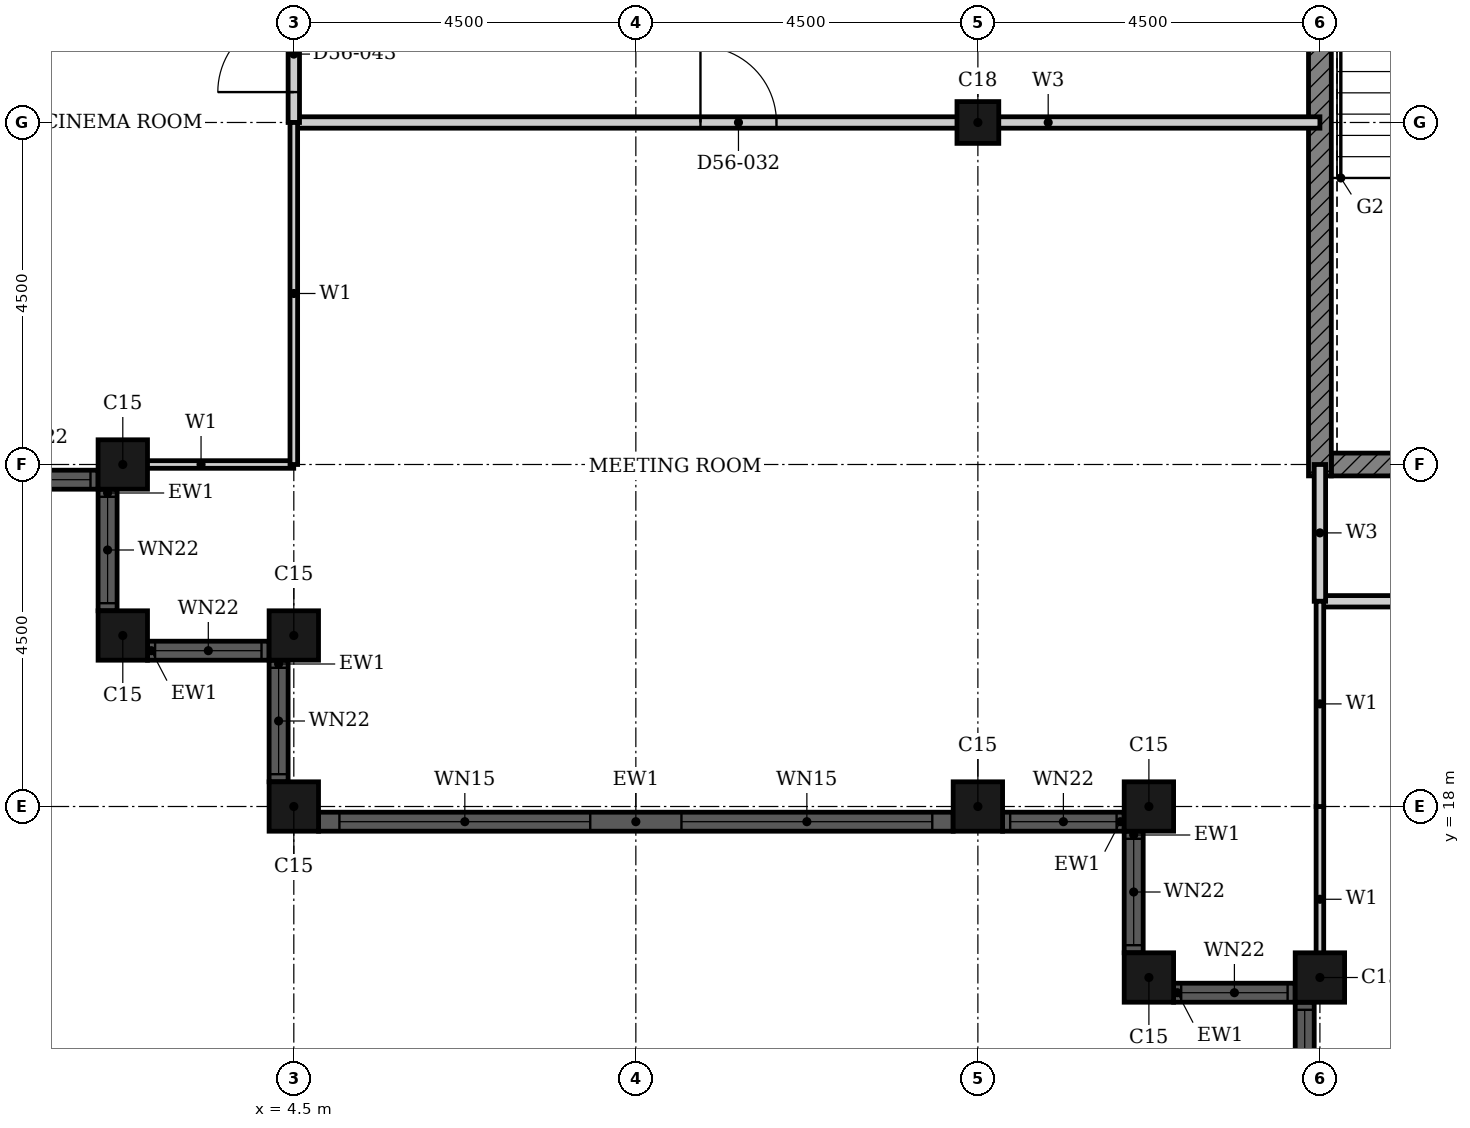
"""IFC4 building model, lengths in metres.
Left out: names, types, materials, properties, quantities, classifications, styles, units other than length and angle.
Written with IfcOpenShell. Run it as: python <this file> out.ifc"""

import sys

from ifc_helpers import new_model, si_unit, direction, frame, frame_2d, origin, origin_2d, place, context, subcontext, project, spatial, rectangle, hollow_rectangle, extrude, element, fill, save


model = new_model("IFC4")
c1 = context("Model", 3, precision=1e-05, world=origin(), true_north=direction((0.0, 1.0)))
c2 = subcontext(c1, "Body", "Model", "MODEL_VIEW")
j1 = project(units=[si_unit("LENGTHUNIT", "METRE"), si_unit("PLANEANGLEUNIT", "RADIAN")], contexts=[c1])
p1 = place(None, origin())
s1 = spatial("IfcSite", under=j1, at=p1, CompositionType="ELEMENT")
p2 = place(p1, origin())
s2 = spatial("IfcBuilding", under=s1, at=p2, CompositionType="ELEMENT")
p3 = place(p2, frame((0.0, 0.0, 222.0)))
s3 = spatial("IfcBuildingStorey", under=s2, at=p3, CompositionType="ELEMENT", Elevation=222.0)
for number, where, z_axis, x_axis in (
    (1, (2.25, 22.5, 0.0), (0.0, 0.0, 1.0), (1.0, 0.0, 0.0)),
    (2, (2.25, 20.25, 0.0), (0.0, 0.0, 1.0), (1.0, 0.0, 0.0)),
    (3, (4.5, 20.25, 0.0), (0.0, 0.0, 1.0), (1.0, 0.0, 0.0)),
    (4, (4.5, 18.0, 0.0), (0.0, 0.0, 1.0), (1.0, 0.0, 0.0)),
    (5, (13.5, 18.0, 0.0), (0.0, 0.0, 1.0), (1.0, 0.0, 0.0)),
    (6, (15.75, 18.0, 0.0), (0.0, 0.0, 1.0), (1.0, 0.0, 0.0)),
    (7, (15.75, 15.75, 0.0), (0.0, 0.0, 1.0), (1.0, 0.0, 0.0)),
    (8, (18.0, 15.75, 0.0), (0.0, 0.0, 1.0), (1.0, 0.0, 0.0)),
):
    element("IfcColumn", number, at=place(p3, frame(where, z_axis=z_axis, x_axis=x_axis)), inside=s3, PredefinedType="COLUMN", context=c2, shape_type="SweptSolid", body=[
        extrude(hollow_rectangle(XDim=0.65, YDim=0.65, WallThickness=0.021, at=origin_2d()), origin(), (0.0, 0.0, 1.0), 3.7),
    ])
p4 = place(p3, frame((13.5, 27.0, 0.0), z_axis=(0.0, 0.0, 1.0), x_axis=(1.0, 0.0, 0.0)))
e9 = element("IfcColumn", 9, at=p4, inside=s3, PredefinedType="COLUMN", context=c2, shape_type="SweptSolid", body=[
    extrude(hollow_rectangle(XDim=0.55, YDim=0.55, WallThickness=0.018, at=origin_2d()), origin(), (0.0, 0.0, 1.0), 3.7),
])
p5 = place(p3, frame((0.325, 22.3, 0.0), z_axis=(0.0, 0.0, 1.0), x_axis=(1.0, 0.0, 0.0)))
e10 = element("IfcWall", 10, at=p5, inside=s3, PredefinedType="SOLIDWALL", context=c2, shape_type="SweptSolid", body=[
    extrude(rectangle(XDim=1.6, YDim=0.25, at=frame_2d((0.8, 0.0))), origin(), (0.0, 0.0, 1.0), 3.7),
])
p6 = place(p5, frame((0.1, 0.0, 0.9)))
e11 = element("IfcOpeningElement", 11, at=p6, cuts=e10, PredefinedType="OPENING", context=c2, shape_type="SweptSolid", body=[
    extrude(rectangle(XDim=1.4, YDim=1.85, at=frame_2d((0.7, 0.925))), frame((0.0, 0.135, 0.0), z_axis=(0.0, -1.0, 0.0), x_axis=(1.0, 0.0, 0.0)), (0.0, 0.0, 1.0), 0.27),
])
p7 = place(p3, frame((2.05, 22.175, 0.0), z_axis=(0.0, 0.0, 1.0), x_axis=(0.0, -1.0, 0.0)))
e12 = element("IfcWall", 12, at=p7, inside=s3, PredefinedType="SOLIDWALL", context=c2, shape_type="SweptSolid", body=[
    extrude(rectangle(XDim=1.6, YDim=0.25, at=frame_2d((0.8, 0.0))), origin(), (0.0, 0.0, 1.0), 3.7),
])
p8 = place(p7, frame((0.1, 0.0, 0.9)))
e13 = element("IfcOpeningElement", 13, at=p8, cuts=e12, PredefinedType="OPENING", context=c2, shape_type="SweptSolid", body=[
    extrude(rectangle(XDim=1.4, YDim=1.85, at=frame_2d((0.7, 0.925))), frame((0.0, 0.135, 0.0), z_axis=(0.0, -1.0, 0.0), x_axis=(1.0, 0.0, 0.0)), (0.0, 0.0, 1.0), 0.27),
])
p9 = place(p3, frame((2.575, 20.05, 0.0), z_axis=(0.0, 0.0, 1.0), x_axis=(1.0, 0.0, 0.0)))
e14 = element("IfcWall", 14, at=p9, inside=s3, PredefinedType="SOLIDWALL", context=c2, shape_type="SweptSolid", body=[
    extrude(rectangle(XDim=1.6, YDim=0.25, at=frame_2d((0.8, 0.0))), origin(), (0.0, 0.0, 1.0), 3.7),
])
p10 = place(p9, frame((0.1, 0.0, 0.9)))
e15 = element("IfcOpeningElement", 15, at=p10, cuts=e14, PredefinedType="OPENING", context=c2, shape_type="SweptSolid", body=[
    extrude(rectangle(XDim=1.4, YDim=1.85, at=frame_2d((0.7, 0.925))), frame((0.0, 0.135, 0.0), z_axis=(0.0, -1.0, 0.0), x_axis=(1.0, 0.0, 0.0)), (0.0, 0.0, 1.0), 0.27),
])
p11 = place(p3, frame((4.3, 19.925, 0.0), z_axis=(0.0, 0.0, 1.0), x_axis=(0.0, -1.0, 0.0)))
e16 = element("IfcWall", 16, at=p11, inside=s3, PredefinedType="SOLIDWALL", context=c2, shape_type="SweptSolid", body=[
    extrude(rectangle(XDim=1.6, YDim=0.25, at=frame_2d((0.8, 0.0))), origin(), (0.0, 0.0, 1.0), 3.7),
])
p12 = place(p11, frame((0.1, 0.0, 0.9)))
e17 = element("IfcOpeningElement", 17, at=p12, cuts=e16, PredefinedType="OPENING", context=c2, shape_type="SweptSolid", body=[
    extrude(rectangle(XDim=1.4, YDim=1.85, at=frame_2d((0.7, 0.925))), frame((0.0, 0.135, 0.0), z_axis=(0.0, -1.0, 0.0), x_axis=(1.0, 0.0, 0.0)), (0.0, 0.0, 1.0), 0.27),
])
p13 = place(p3, frame((4.825, 17.8, 0.0), z_axis=(0.0, 0.0, 1.0), x_axis=(1.0, 0.0, 0.0)))
e18 = element("IfcWall", 18, at=p13, inside=s3, PredefinedType="SOLIDWALL", context=c2, shape_type="SweptSolid", body=[
    extrude(rectangle(XDim=8.35, YDim=0.25, at=frame_2d((4.175, 0.0))), origin(), (0.0, 0.0, 1.0), 3.7),
])
p14 = place(p13, frame((0.275, 0.0, 0.45)))
e19 = element("IfcOpeningElement", 19, at=p14, cuts=e18, PredefinedType="OPENING", context=c2, shape_type="SweptSolid", body=[
    extrude(rectangle(XDim=3.3, YDim=2.3, at=frame_2d((1.65, 1.15))), frame((0.0, 0.135, 0.0), z_axis=(0.0, -1.0, 0.0), x_axis=(1.0, 0.0, 0.0)), (0.0, 0.0, 1.0), 0.27),
])
p15 = place(p13, frame((4.775, 0.0, 0.45)))
e20 = element("IfcOpeningElement", 20, at=p15, cuts=e18, PredefinedType="OPENING", context=c2, shape_type="SweptSolid", body=[
    extrude(rectangle(XDim=3.3, YDim=2.3, at=frame_2d((1.65, 1.15))), frame((0.0, 0.135, 0.0), z_axis=(0.0, -1.0, 0.0), x_axis=(1.0, 0.0, 0.0)), (0.0, 0.0, 1.0), 0.27),
])
p16 = place(p3, frame((13.825, 17.8, 0.0), z_axis=(0.0, 0.0, 1.0), x_axis=(1.0, 0.0, 0.0)))
e21 = element("IfcWall", 21, at=p16, inside=s3, PredefinedType="SOLIDWALL", context=c2, shape_type="SweptSolid", body=[
    extrude(rectangle(XDim=1.6, YDim=0.25, at=frame_2d((0.8, 0.0))), origin(), (0.0, 0.0, 1.0), 3.7),
])
p17 = place(p16, frame((0.1, 0.0, 0.9)))
e22 = element("IfcOpeningElement", 22, at=p17, cuts=e21, PredefinedType="OPENING", context=c2, shape_type="SweptSolid", body=[
    extrude(rectangle(XDim=1.4, YDim=1.85, at=frame_2d((0.7, 0.925))), frame((0.0, 0.135, 0.0), z_axis=(0.0, -1.0, 0.0), x_axis=(1.0, 0.0, 0.0)), (0.0, 0.0, 1.0), 0.27),
])
p18 = place(p3, frame((15.55, 17.675, 0.0), z_axis=(0.0, 0.0, 1.0), x_axis=(0.0, -1.0, 0.0)))
e23 = element("IfcWall", 23, at=p18, inside=s3, PredefinedType="SOLIDWALL", context=c2, shape_type="SweptSolid", body=[
    extrude(rectangle(XDim=1.6, YDim=0.25, at=frame_2d((0.8, 0.0))), origin(), (0.0, 0.0, 1.0), 3.7),
])
p19 = place(p18, frame((0.1, 0.0, 0.9)))
e24 = element("IfcOpeningElement", 24, at=p19, cuts=e23, PredefinedType="OPENING", context=c2, shape_type="SweptSolid", body=[
    extrude(rectangle(XDim=1.4, YDim=1.85, at=frame_2d((0.7, 0.925))), frame((0.0, 0.135, 0.0), z_axis=(0.0, -1.0, 0.0), x_axis=(1.0, 0.0, 0.0)), (0.0, 0.0, 1.0), 0.27),
])
p20 = place(p3, frame((16.075, 15.55, 0.0), z_axis=(0.0, 0.0, 1.0), x_axis=(1.0, 0.0, 0.0)))
e25 = element("IfcWall", 25, at=p20, inside=s3, PredefinedType="SOLIDWALL", context=c2, shape_type="SweptSolid", body=[
    extrude(rectangle(XDim=1.6, YDim=0.25, at=frame_2d((0.8, 0.0))), origin(), (0.0, 0.0, 1.0), 3.7),
])
p21 = place(p20, frame((0.1, 0.0, 0.9)))
e26 = element("IfcOpeningElement", 26, at=p21, cuts=e25, PredefinedType="OPENING", context=c2, shape_type="SweptSolid", body=[
    extrude(rectangle(XDim=1.4, YDim=1.85, at=frame_2d((0.7, 0.925))), frame((0.0, 0.135, 0.0), z_axis=(0.0, -1.0, 0.0), x_axis=(1.0, 0.0, 0.0)), (0.0, 0.0, 1.0), 0.27),
])
p22 = place(p3, frame((17.8, 15.425, 0.0), z_axis=(0.0, 0.0, 1.0), x_axis=(0.0, -1.0, 0.0)))
e27 = element("IfcWall", 27, at=p22, inside=s3, PredefinedType="SOLIDWALL", context=c2, shape_type="SweptSolid", body=[
    extrude(rectangle(XDim=1.6, YDim=0.25, at=frame_2d((0.8, 0.0))), origin(), (0.0, 0.0, 1.0), 3.7),
])
p23 = place(p22, frame((0.1, 0.0, 0.9)))
e28 = element("IfcOpeningElement", 28, at=p23, cuts=e27, PredefinedType="OPENING", context=c2, shape_type="SweptSolid", body=[
    extrude(rectangle(XDim=1.4, YDim=1.85, at=frame_2d((0.7, 0.925))), frame((0.0, 0.135, 0.0), z_axis=(0.0, -1.0, 0.0), x_axis=(1.0, 0.0, 0.0)), (0.0, 0.0, 1.0), 0.27),
])
p24 = place(p3, frame((18.15, 22.5, 0.0), z_axis=(0.0, 0.0, 1.0), x_axis=(1.0, 0.0, 0.0)))
e29 = element("IfcWall", 29, at=p24, inside=s3, PredefinedType="SHEAR", context=c2, shape_type="SweptSolid", body=[
    extrude(rectangle(XDim=4.225, YDim=0.3, at=frame_2d((2.113, 0.0))), origin(), (0.0, 0.0, 1.0), 3.4),
])
p25 = place(p3, frame((18.0, 22.35, 0.0), z_axis=(0.0, 0.0, 1.0), x_axis=(0.0, 1.0, 0.0)))
e30 = element("IfcWall", 30, at=p25, inside=s3, PredefinedType="SHEAR", context=c2, shape_type="SweptSolid", body=[
    extrude(rectangle(XDim=9.3, YDim=0.3, at=frame_2d((4.65, 0.0))), origin(), (0.0, 0.0, 1.0), 3.4),
])
p26 = place(p3, frame((18.0, 20.7, 0.0), z_axis=(0.0, 0.0, 1.0), x_axis=(1.0, 0.0, 0.0)))
e31 = element("IfcWall", 31, at=p26, inside=s3, PredefinedType="PARTITIONING", context=c2, shape_type="SweptSolid", body=[
    extrude(rectangle(XDim=13.5, YDim=0.15, at=frame_2d((6.75, 0.0))), origin(), (0.0, 0.0, 1.0), 3.4),
])
p27 = place(p26, frame((6.25, 0.0, 0.0)))
e32 = element("IfcOpeningElement", 32, at=p27, cuts=e31, PredefinedType="OPENING", context=c2, shape_type="SweptSolid", body=[
    extrude(rectangle(XDim=1.0, YDim=2.1, at=frame_2d((0.5, 1.05))), frame((0.0, 0.085, 0.0), z_axis=(0.0, -1.0, 0.0), x_axis=(1.0, 0.0, 0.0)), (0.0, 0.0, 1.0), 0.17),
])
p28 = place(p3, frame((4.5, 27.0, 0.0), z_axis=(0.0, 0.0, 1.0), x_axis=(1.0, 0.0, 0.0)))
e33 = element("IfcWall", 33, at=p28, inside=s3, PredefinedType="PARTITIONING", context=c2, shape_type="SweptSolid", body=[
    extrude(rectangle(XDim=13.5, YDim=0.15, at=frame_2d((6.75, 0.0))), origin(), (0.0, 0.0, 1.0), 2.68),
])
p29 = place(p28, frame((5.35, 0.0, 0.0)))
e34 = element("IfcOpeningElement", 34, at=p29, cuts=e33, PredefinedType="OPENING", context=c2, shape_type="SweptSolid", body=[
    extrude(rectangle(XDim=1.0, YDim=2.1, at=frame_2d((0.5, 1.05))), frame((0.0, 0.085, 0.0), z_axis=(0.0, -1.0, 0.0), x_axis=(1.0, 0.0, 0.0)), (0.0, 0.0, 1.0), 0.17),
])
p30 = place(p3, frame((18.0, 20.7, 0.0), z_axis=(0.0, 0.0, 1.0), x_axis=(0.0, 1.0, 0.0)))
e35 = element("IfcWall", 35, at=p30, inside=s3, PredefinedType="PARTITIONING", context=c2, shape_type="SweptSolid", body=[
    extrude(rectangle(XDim=1.8, YDim=0.15, at=frame_2d((0.9, 0.0))), origin(), (0.0, 0.0, 1.0), 3.4),
])
p31 = place(p3, frame((4.5, 27.0, 0.0), z_axis=(0.0, 0.0, 1.0), x_axis=(0.0, 1.0, 0.0)))
e36 = element("IfcWall", 36, at=p31, inside=s3, PredefinedType="PARTITIONING", context=c2, shape_type="SweptSolid", body=[
    extrude(rectangle(XDim=1.8, YDim=0.15, at=frame_2d((0.9, 0.0))), origin(), (0.0, 0.0, 1.0), 3.4),
])
p32 = place(p31, frame((0.4, 0.0, 0.0)))
e37 = element("IfcOpeningElement", 37, at=p32, cuts=e36, PredefinedType="OPENING", context=c2, shape_type="SweptSolid", body=[
    extrude(rectangle(XDim=1.0, YDim=2.1, at=frame_2d((0.5, 1.05))), frame((0.0, 0.085, 0.0), z_axis=(0.0, -1.0, 0.0), x_axis=(1.0, 0.0, 0.0)), (0.0, 0.0, 1.0), 0.17),
])
p33 = place(p3, frame((2.06, 22.5, 0.0), z_axis=(0.0, 0.0, 1.0), x_axis=(1.0, 0.0, 0.0)))
e38 = element("IfcWall", 38, at=p33, inside=s3, PredefinedType="PARTITIONING", context=c2, shape_type="SweptSolid", body=[
    extrude(rectangle(XDim=2.439, YDim=0.1, at=frame_2d((1.219, 0.0))), origin(), (0.0, 0.0, 1.0), 2.68),
])
p34 = place(p3, frame((18.0, 15.56, 0.0), z_axis=(0.0, 0.0, 1.0), x_axis=(0.0, 1.0, 0.0)))
e39 = element("IfcWall", 39, at=p34, inside=s3, PredefinedType="PARTITIONING", context=c2, shape_type="SweptSolid", body=[
    extrude(rectangle(XDim=2.439, YDim=0.1, at=frame_2d((1.219, 0.0))), origin(), (0.0, 0.0, 1.0), 3.4),
])
p35 = place(p3, frame((18.0, 18.0, 0.0), z_axis=(0.0, 0.0, 1.0), x_axis=(0.0, 1.0, 0.0)))
e40 = element("IfcWall", 40, at=p35, inside=s3, PredefinedType="PARTITIONING", context=c2, shape_type="SweptSolid", body=[
    extrude(rectangle(XDim=2.7, YDim=0.1, at=frame_2d((1.35, 0.0))), origin(), (0.0, 0.0, 1.0), 3.4),
])
p36 = place(p3, frame((4.5, 22.5, 0.0), z_axis=(0.0, 0.0, 1.0), x_axis=(0.0, 1.0, 0.0)))
e41 = element("IfcWall", 41, at=p36, inside=s3, PredefinedType="PARTITIONING", context=c2, shape_type="SweptSolid", body=[
    extrude(rectangle(XDim=4.5, YDim=0.1, at=frame_2d((2.25, 0.0))), origin(), (0.0, 0.0, 1.0), 3.4),
])
p37 = place(p6, origin())
e42 = element("IfcWindow", 42, at=p37, inside=s3, PartitioningType="SINGLE_PANEL", PredefinedType="WINDOW", context=c2, shape_type="SweptSolid", body=[
    extrude(rectangle(XDim=1.4, YDim=1.85, at=frame_2d((0.7, 0.925))), frame((0.0, 0.03, 0.0), z_axis=(0.0, -1.0, 0.0), x_axis=(1.0, 0.0, 0.0)), (0.0, 0.0, 1.0), 0.06),
])
fill(e11, e42)
p38 = place(p8, origin())
e43 = element("IfcWindow", 43, at=p38, inside=s3, PartitioningType="SINGLE_PANEL", PredefinedType="WINDOW", context=c2, shape_type="SweptSolid", body=[
    extrude(rectangle(XDim=1.4, YDim=1.85, at=frame_2d((0.7, 0.925))), frame((0.0, 0.03, 0.0), z_axis=(0.0, -1.0, 0.0), x_axis=(1.0, 0.0, 0.0)), (0.0, 0.0, 1.0), 0.06),
])
fill(e13, e43)
p39 = place(p10, origin())
e44 = element("IfcWindow", 44, at=p39, inside=s3, PartitioningType="SINGLE_PANEL", PredefinedType="WINDOW", context=c2, shape_type="SweptSolid", body=[
    extrude(rectangle(XDim=1.4, YDim=1.85, at=frame_2d((0.7, 0.925))), frame((0.0, 0.03, 0.0), z_axis=(0.0, -1.0, 0.0), x_axis=(1.0, 0.0, 0.0)), (0.0, 0.0, 1.0), 0.06),
])
fill(e15, e44)
p40 = place(p12, origin())
e45 = element("IfcWindow", 45, at=p40, inside=s3, PartitioningType="SINGLE_PANEL", PredefinedType="WINDOW", context=c2, shape_type="SweptSolid", body=[
    extrude(rectangle(XDim=1.4, YDim=1.85, at=frame_2d((0.7, 0.925))), frame((0.0, 0.03, 0.0), z_axis=(0.0, -1.0, 0.0), x_axis=(1.0, 0.0, 0.0)), (0.0, 0.0, 1.0), 0.06),
])
fill(e17, e45)
p41 = place(p14, origin())
e46 = element("IfcWindow", 46, at=p41, inside=s3, PartitioningType="SINGLE_PANEL", PredefinedType="WINDOW", context=c2, shape_type="SweptSolid", body=[
    extrude(rectangle(XDim=3.3, YDim=2.3, at=frame_2d((1.65, 1.15))), frame((0.0, 0.03, 0.0), z_axis=(0.0, -1.0, 0.0), x_axis=(1.0, 0.0, 0.0)), (0.0, 0.0, 1.0), 0.06),
])
fill(e19, e46)
p42 = place(p15, origin())
e47 = element("IfcWindow", 47, at=p42, inside=s3, PartitioningType="SINGLE_PANEL", PredefinedType="WINDOW", context=c2, shape_type="SweptSolid", body=[
    extrude(rectangle(XDim=3.3, YDim=2.3, at=frame_2d((1.65, 1.15))), frame((0.0, 0.03, 0.0), z_axis=(0.0, -1.0, 0.0), x_axis=(1.0, 0.0, 0.0)), (0.0, 0.0, 1.0), 0.06),
])
fill(e20, e47)
p43 = place(p17, origin())
e48 = element("IfcWindow", 48, at=p43, inside=s3, PartitioningType="SINGLE_PANEL", PredefinedType="WINDOW", context=c2, shape_type="SweptSolid", body=[
    extrude(rectangle(XDim=1.4, YDim=1.85, at=frame_2d((0.7, 0.925))), frame((0.0, 0.03, 0.0), z_axis=(0.0, -1.0, 0.0), x_axis=(1.0, 0.0, 0.0)), (0.0, 0.0, 1.0), 0.06),
])
fill(e22, e48)
p44 = place(p19, origin())
e49 = element("IfcWindow", 49, at=p44, inside=s3, PartitioningType="SINGLE_PANEL", PredefinedType="WINDOW", context=c2, shape_type="SweptSolid", body=[
    extrude(rectangle(XDim=1.4, YDim=1.85, at=frame_2d((0.7, 0.925))), frame((0.0, 0.03, 0.0), z_axis=(0.0, -1.0, 0.0), x_axis=(1.0, 0.0, 0.0)), (0.0, 0.0, 1.0), 0.06),
])
fill(e24, e49)
p45 = place(p21, origin())
e50 = element("IfcWindow", 50, at=p45, inside=s3, PartitioningType="SINGLE_PANEL", PredefinedType="WINDOW", context=c2, shape_type="SweptSolid", body=[
    extrude(rectangle(XDim=1.4, YDim=1.85, at=frame_2d((0.7, 0.925))), frame((0.0, 0.03, 0.0), z_axis=(0.0, -1.0, 0.0), x_axis=(1.0, 0.0, 0.0)), (0.0, 0.0, 1.0), 0.06),
])
fill(e26, e50)
p46 = place(p23, origin())
e51 = element("IfcWindow", 51, at=p46, inside=s3, PartitioningType="SINGLE_PANEL", PredefinedType="WINDOW", context=c2, shape_type="SweptSolid", body=[
    extrude(rectangle(XDim=1.4, YDim=1.85, at=frame_2d((0.7, 0.925))), frame((0.0, 0.03, 0.0), z_axis=(0.0, -1.0, 0.0), x_axis=(1.0, 0.0, 0.0)), (0.0, 0.0, 1.0), 0.06),
])
fill(e28, e51)
p47 = place(p29, origin())
e52 = element("IfcDoor", 52, at=p47, inside=s3, OperationType="SINGLE_SWING_LEFT", PredefinedType="DOOR", context=c2, shape_type="SweptSolid", body=[
    extrude(rectangle(XDim=1.0, YDim=2.1, at=frame_2d((0.5, 1.05))), frame((0.0, 0.025, 0.0), z_axis=(0.0, -1.0, 0.0), x_axis=(1.0, 0.0, 0.0)), (0.0, 0.0, 1.0), 0.05),
])
fill(e34, e52)
p48 = place(p32, origin())
e53 = element("IfcDoor", 53, at=p48, inside=s3, OperationType="SINGLE_SWING_LEFT", PredefinedType="DOOR", context=c2, shape_type="SweptSolid", body=[
    extrude(rectangle(XDim=1.0, YDim=2.1, at=frame_2d((0.5, 1.05))), frame((0.0, 0.025, 0.0), z_axis=(0.0, -1.0, 0.0), x_axis=(1.0, 0.0, 0.0)), (0.0, 0.0, 1.0), 0.05),
])
fill(e37, e53)
save(model, sys.argv[1])
